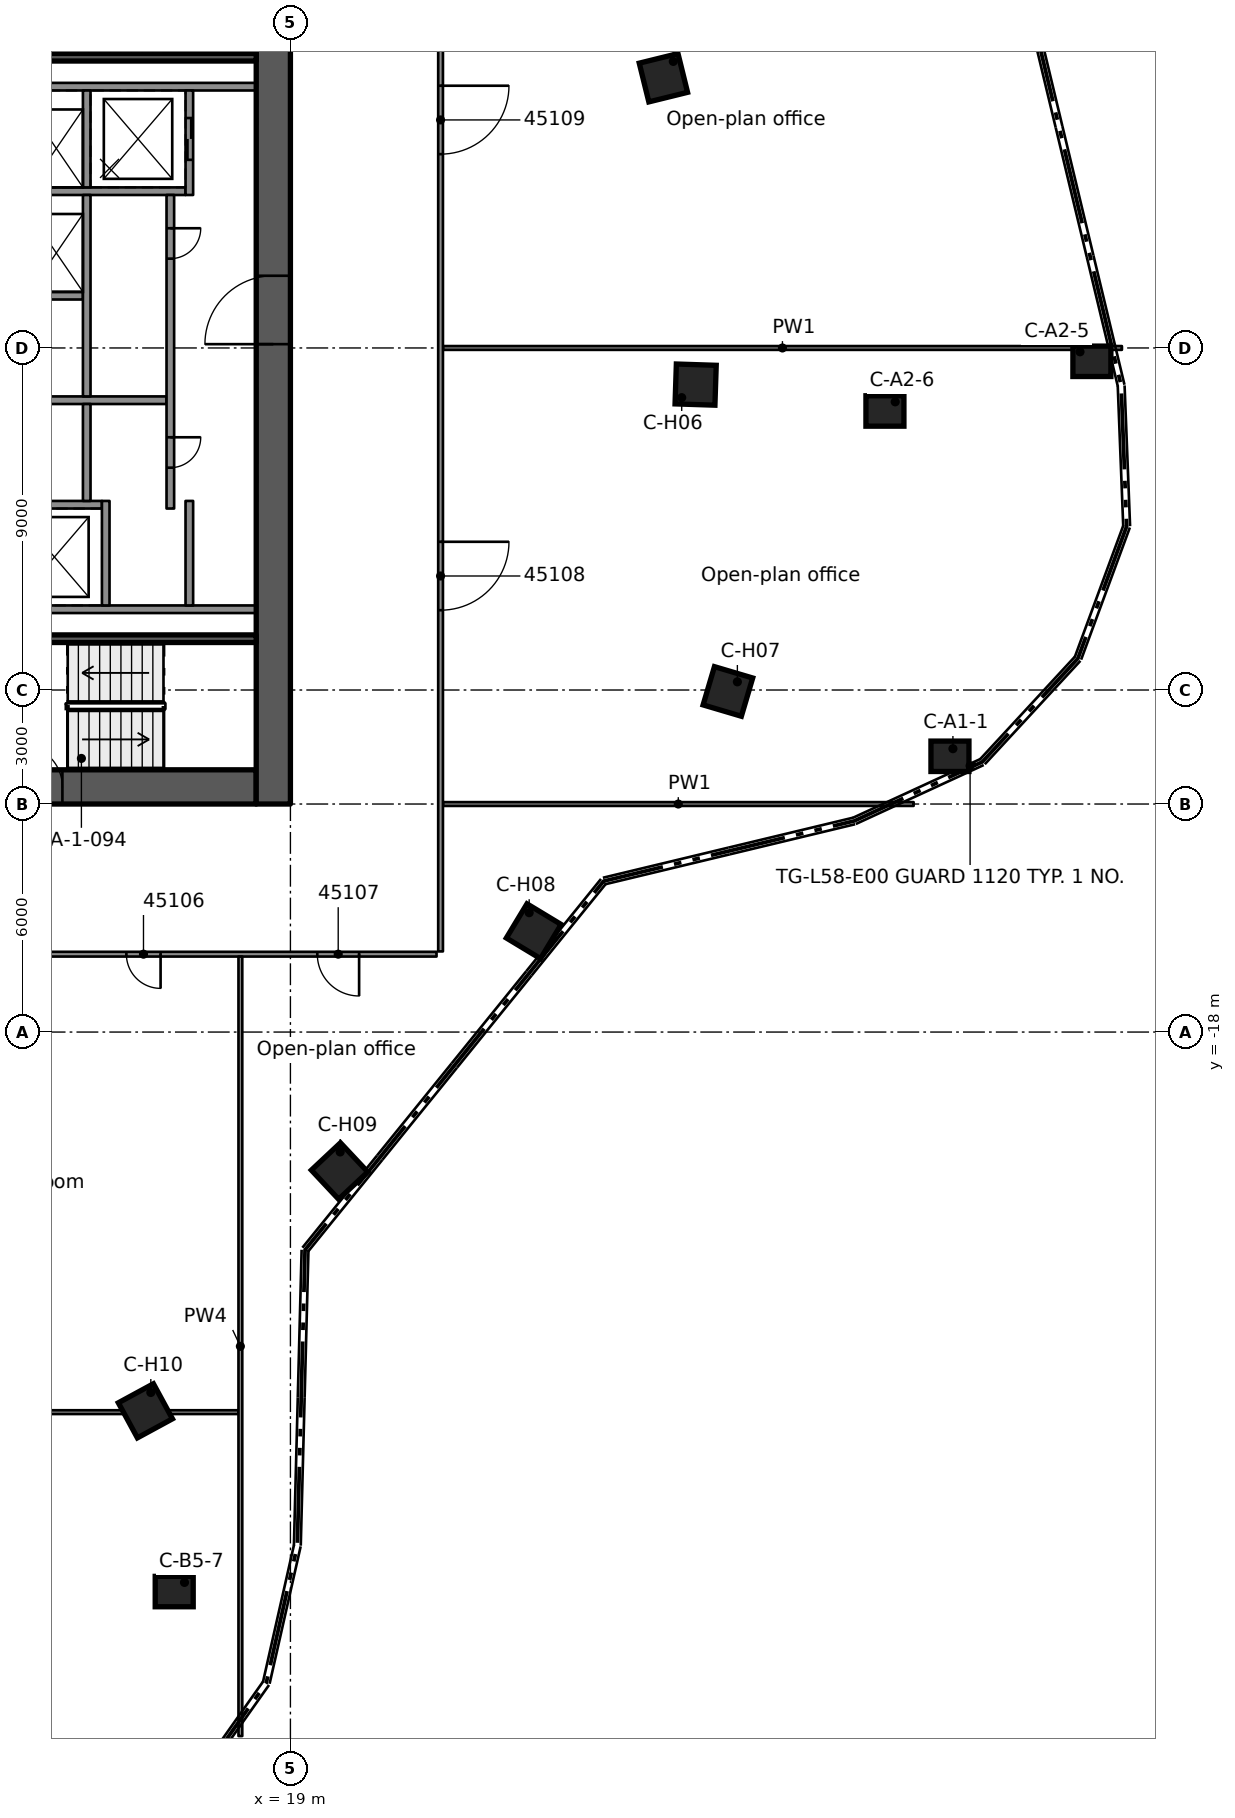
"""IFC4 building model, lengths in metres.
Left out: names, types, materials, properties, quantities, classifications, styles, units other than length and angle.
Written with IfcOpenShell. Run it as: python <this file> out.ifc"""

import sys

from ifc_helpers import new_model, si_unit, direction, frame, frame_2d, origin, origin_2d, place, context, subcontext, project, spatial, rectangle, extrude, element, fill, save


model = new_model("IFC4")
c1 = context("Model", 3, precision=1e-05, world=origin(), true_north=direction((0.0, 1.0)))
c2 = subcontext(c1, "Body", "Model", "MODEL_VIEW")
j1 = project(units=[si_unit("LENGTHUNIT", "METRE"), si_unit("PLANEANGLEUNIT", "RADIAN")], contexts=[c1])
p1 = place(None, origin())
s1 = spatial("IfcSite", under=j1, at=p1, CompositionType="ELEMENT")
p2 = place(p1, origin())
s2 = spatial("IfcBuilding", under=s1, at=p2, CompositionType="ELEMENT")
p3 = place(p2, frame((0.0, 0.0, 221.0)))
s3 = spatial("IfcBuildingStorey", under=s2, at=p3, CompositionType="ELEMENT", Elevation=221.0)
p4 = place(p3, frame((8.9, -11.55, 0.0), z_axis=(0.0, 0.0, 1.0), x_axis=(1.0, 0.0, 0.0)))
e1 = element("IfcWall", 1, at=p4, inside=s3, PredefinedType="SHEAR", context=c2, shape_type="SweptSolid", body=[
    extrude(rectangle(XDim=9.2, YDim=0.9, at=frame_2d((4.6, 0.0))), origin(), (0.0, 0.0, 1.0), 3.5),
])
p5 = place(p4, frame((3.0, 0.0, 0.0)))
e2 = element("IfcOpeningElement", 2, at=p5, cuts=e1, PredefinedType="OPENING", context=c2, shape_type="SweptSolid", body=[
    extrude(rectangle(XDim=1.1, YDim=2.1, at=frame_2d((0.55, 1.05))), frame((0.0, 0.46, 0.0), z_axis=(0.0, -1.0, 0.0), x_axis=(1.0, 0.0, 0.0)), (0.0, 0.0, 1.0), 0.92),
])
p6 = place(p3, frame((18.55, -12.0, 0.0), z_axis=(0.0, 0.0, 1.0), x_axis=(0.0, 1.0, 0.0)))
e3 = element("IfcWall", 3, at=p6, inside=s3, PredefinedType="SHEAR", context=c2, shape_type="SweptSolid", body=[
    extrude(rectangle(XDim=24.0, YDim=0.9, at=frame_2d((12.0, 0.0))), origin(), (0.0, 0.0, 1.0), 3.5),
])
p7 = place(p6, frame((12.1, 0.0, 0.0)))
e4 = element("IfcOpeningElement", 4, at=p7, cuts=e3, PredefinedType="OPENING", context=c2, shape_type="SweptSolid", body=[
    extrude(rectangle(XDim=1.8, YDim=2.1, at=frame_2d((0.9, 1.05))), frame((0.0, 0.46, 0.0), z_axis=(0.0, -1.0, 0.0), x_axis=(1.0, 0.0, 0.0)), (0.0, 0.0, 1.0), 0.92),
])
for number, where, z_axis, x_axis in (
    (5, (36.355, -10.744, 0.0), (0.0, 0.0, 1.0), (1.0, 0.0, 0.0)),
    (6, (40.09, -0.351, 0.0), (0.0, 0.0, 1.0), (1.0, 0.0, 0.0)),
    (7, (34.644, -1.658, 0.0), (0.0, 0.0, 1.0), (1.0, 0.0, 0.0)),
    (8, (15.942, -32.722, 0.0), (0.0, 0.0, 1.0), (1.0, 0.0, 0.0)),
):
    element("IfcColumn", number, at=place(p3, frame(where, z_axis=z_axis, x_axis=x_axis)), inside=s3, PredefinedType="COLUMN", context=c2, shape_type="SweptSolid", body=[
        extrude(rectangle(XDim=1.0, YDim=0.8, at=origin_2d()), origin(), (0.0, 0.0, 1.0), 3.5),
    ])
for number, where, z_axis, x_axis in (
    (9, (28.815, 7.11, 0.0), (0.0, 0.0, 1.0), (0.971, 0.24, 0.0)),
    (10, (29.663, -0.964, 0.0), (0.0, 0.0, 1.0), (0.999, -0.032, 0.0)),
    (11, (30.512, -9.038, 0.0), (0.0, 0.0, 1.0), (0.959, -0.284, 0.0)),
    (12, (25.403, -15.347, 0.0), (0.0, 0.0, 1.0), (0.856, -0.517, 0.0)),
    (13, (20.293, -21.657, 0.0), (0.0, 0.0, 1.0), (0.684, -0.73, 0.0)),
    (14, (15.184, -27.966, 0.0), (0.0, 0.0, 1.0), (0.477, -0.879, 0.0)),
):
    element("IfcColumn", number, at=place(p3, frame(where, z_axis=z_axis, x_axis=x_axis)), inside=s3, PredefinedType="COLUMN", context=c2, shape_type="SweptSolid", body=[
        extrude(rectangle(XDim=1.05, YDim=1.05, at=origin_2d()), origin(), (0.0, 0.0, 1.0), 3.5),
    ])
for number, where, z_axis, x_axis in (
    (15, (11.54, -6.875, 0.0), (0.0, 0.0, 1.0), (1.0, 0.0, 0.0)),
    (16, (11.54, 6.875, 0.0), (0.0, 0.0, 1.0), (1.0, 0.0, 0.0)),
):
    element("IfcWall", number, at=place(p3, frame(where, z_axis=z_axis, x_axis=x_axis)), inside=s3, PredefinedType="SOLIDWALL", context=c2, shape_type="SweptSolid", body=[
        extrude(rectangle(XDim=6.56, YDim=0.2, at=frame_2d((3.28, 0.0))), origin(), (0.0, 0.0, 1.0), 3.08),
    ])
p8 = place(p3, frame((11.54, 4.125, 0.0), z_axis=(0.0, 0.0, 1.0), x_axis=(1.0, 0.0, 0.0)))
e17 = element("IfcWall", 17, at=p8, inside=s3, PredefinedType="SOLIDWALL", context=c2, shape_type="SweptSolid", body=[
    extrude(rectangle(XDim=4.7, YDim=0.2, at=frame_2d((2.35, 0.0))), origin(), (0.0, 0.0, 1.0), 3.08),
])
p9 = place(p3, frame((11.54, 1.375, 0.0), z_axis=(0.0, 0.0, 1.0), x_axis=(1.0, 0.0, 0.0)))
e18 = element("IfcWall", 18, at=p9, inside=s3, PredefinedType="SOLIDWALL", context=c2, shape_type="SweptSolid", body=[
    extrude(rectangle(XDim=2.0, YDim=0.2, at=frame_2d((1.0, 0.0))), origin(), (0.0, 0.0, 1.0), 3.08),
])
p10 = place(p3, frame((11.54, -1.375, 0.0), z_axis=(0.0, 0.0, 1.0), x_axis=(1.0, 0.0, 0.0)))
e19 = element("IfcWall", 19, at=p10, inside=s3, PredefinedType="SOLIDWALL", context=c2, shape_type="SweptSolid", body=[
    extrude(rectangle(XDim=4.2, YDim=0.2, at=frame_2d((2.1, 0.0))), origin(), (0.0, 0.0, 1.0), 3.08),
])
p11 = place(p3, frame((11.54, -4.125, 0.0), z_axis=(0.0, 0.0, 1.0), x_axis=(1.0, 0.0, 0.0)))
e20 = element("IfcWall", 20, at=p11, inside=s3, PredefinedType="SOLIDWALL", context=c2, shape_type="SweptSolid", body=[
    extrude(rectangle(XDim=2.5, YDim=0.2, at=frame_2d((1.25, 0.0))), origin(), (0.0, 0.0, 1.0), 3.08),
])
p12 = place(p3, frame((13.64, 6.775, 0.0), z_axis=(0.0, 0.0, 1.0), x_axis=(0.0, -1.0, 0.0)))
e21 = element("IfcWall", 21, at=p12, inside=s3, PredefinedType="SOLIDWALL", context=c2, shape_type="SweptSolid", body=[
    extrude(rectangle(XDim=2.55, YDim=0.2, at=frame_2d((1.275, 0.0))), origin(), (0.0, 0.0, 1.0), 3.08),
])
p13 = place(p3, frame((13.64, 4.025, 0.0), z_axis=(0.0, 0.0, 1.0), x_axis=(0.0, -1.0, 0.0)))
e22 = element("IfcWall", 22, at=p13, inside=s3, PredefinedType="SOLIDWALL", context=c2, shape_type="SweptSolid", body=[
    extrude(rectangle(XDim=5.3, YDim=0.2, at=frame_2d((2.65, 0.0))), origin(), (0.0, 0.0, 1.0), 3.08),
])
p14 = place(p3, frame((13.64, -1.475, 0.0), z_axis=(0.0, 0.0, 1.0), x_axis=(0.0, -1.0, 0.0)))
e23 = element("IfcWall", 23, at=p14, inside=s3, PredefinedType="SOLIDWALL", context=c2, shape_type="SweptSolid", body=[
    extrude(rectangle(XDim=2.55, YDim=0.2, at=frame_2d((1.275, 0.0))), origin(), (0.0, 0.0, 1.0), 3.08),
])
p15 = place(p3, frame((14.14, -4.025, 0.0), z_axis=(0.0, 0.0, 1.0), x_axis=(0.0, -1.0, 0.0)))
e24 = element("IfcWall", 24, at=p15, inside=s3, PredefinedType="SOLIDWALL", context=c2, shape_type="SweptSolid", body=[
    extrude(rectangle(XDim=2.75, YDim=0.2, at=frame_2d((1.375, 0.0))), origin(), (0.0, 0.0, 1.0), 3.08),
])
p16 = place(p3, frame((16.34, 6.775, 0.0), z_axis=(0.0, 0.0, 1.0), x_axis=(0.0, -1.0, 0.0)))
e25 = element("IfcWall", 25, at=p16, inside=s3, PredefinedType="SOLIDWALL", context=c2, shape_type="SweptSolid", body=[
    extrude(rectangle(XDim=2.75, YDim=0.2, at=frame_2d((1.375, 0.0))), origin(), (0.0, 0.0, 1.0), 3.08),
])
p17 = place(p16, frame((0.725, 0.0, 0.0)))
e26 = element("IfcOpeningElement", 26, at=p17, cuts=e25, PredefinedType="OPENING", context=c2, shape_type="SweptSolid", body=[
    extrude(rectangle(XDim=1.1, YDim=2.1, at=frame_2d((0.55, 1.05))), frame((0.0, 0.11, 0.0), z_axis=(0.0, -1.0, 0.0), x_axis=(1.0, 0.0, 0.0)), (0.0, 0.0, 1.0), 0.22),
])
p18 = place(p3, frame((15.84, 4.025, 0.0), z_axis=(0.0, 0.0, 1.0), x_axis=(0.0, -1.0, 0.0)))
e27 = element("IfcWall", 27, at=p18, inside=s3, PredefinedType="SOLIDWALL", context=c2, shape_type="SweptSolid", body=[
    extrude(rectangle(XDim=8.25, YDim=0.2, at=frame_2d((4.125, 0.0))), origin(), (0.0, 0.0, 1.0), 3.08),
])
p19 = place(p18, frame((0.875, 0.0, 0.0)))
e28 = element("IfcOpeningElement", 28, at=p19, cuts=e27, PredefinedType="OPENING", context=c2, shape_type="SweptSolid", body=[
    extrude(rectangle(XDim=0.8, YDim=2.1, at=frame_2d((0.4, 1.05))), frame((0.0, 0.11, 0.0), z_axis=(0.0, -1.0, 0.0), x_axis=(1.0, 0.0, 0.0)), (0.0, 0.0, 1.0), 0.22),
])
p20 = place(p18, frame((6.375, 0.0, 0.0)))
e29 = element("IfcOpeningElement", 29, at=p20, cuts=e27, PredefinedType="OPENING", context=c2, shape_type="SweptSolid", body=[
    extrude(rectangle(XDim=0.8, YDim=2.1, at=frame_2d((0.4, 1.05))), frame((0.0, 0.11, 0.0), z_axis=(0.0, -1.0, 0.0), x_axis=(1.0, 0.0, 0.0)), (0.0, 0.0, 1.0), 0.22),
])
p21 = place(p3, frame((16.34, -4.025, 0.0), z_axis=(0.0, 0.0, 1.0), x_axis=(0.0, -1.0, 0.0)))
e30 = element("IfcWall", 30, at=p21, inside=s3, PredefinedType="SOLIDWALL", context=c2, shape_type="SweptSolid", body=[
    extrude(rectangle(XDim=2.75, YDim=0.2, at=frame_2d((1.375, 0.0))), origin(), (0.0, 0.0, 1.0), 3.08),
])
for number, where, z_axis, x_axis in (
    (31, (11.54, -7.65, 0.0), (0.0, 0.0, 1.0), (1.0, 0.0, 0.0)),
    (32, (11.54, 7.65, 0.0), (0.0, 0.0, 1.0), (1.0, 0.0, 0.0)),
):
    element("IfcWall", number, at=place(p3, frame(where, z_axis=z_axis, x_axis=x_axis)), inside=s3, PredefinedType="SOLIDWALL", context=c2, shape_type="SweptSolid", body=[
        extrude(rectangle(XDim=6.56, YDim=0.2, at=frame_2d((3.28, 0.0))), origin(), (0.0, 0.0, 1.0), 3.08),
    ])
p22 = place(p3, frame((5.999, -28.001, 0.0), z_axis=(0.0, 0.0, 1.0), x_axis=(1.0, 0.0, 0.0)))
e33 = element("IfcWall", 33, at=p22, inside=s3, PredefinedType="PARTITIONING", context=c2, shape_type="SweptSolid", body=[
    extrude(rectangle(XDim=11.634, YDim=0.1, at=frame_2d((5.817, 0.0))), origin(), (0.0, 0.0, 1.0), 2.449),
])
p23 = place(p3, frame((22.845, -15.951, 0.0), z_axis=(0.0, 0.0, 1.0), x_axis=(-1.0, 0.0, 0.0)))
e34 = element("IfcWall", 34, at=p23, inside=s3, PredefinedType="PARTITIONING", context=c2, shape_type="SweptSolid", body=[
    extrude(rectangle(XDim=10.385, YDim=0.125, at=frame_2d((5.192, 0.0))), origin(), (0.0, 0.0, 1.0), 3.06),
])
p24 = place(p23, frame((7.261, 0.0, 0.0)))
e35 = element("IfcOpeningElement", 35, at=p24, cuts=e34, PredefinedType="OPENING", context=c2, shape_type="SweptSolid", body=[
    extrude(rectangle(XDim=0.9, YDim=2.1, at=frame_2d((0.45, 1.05))), frame((0.0, 0.073, 0.0), z_axis=(0.0, -1.0, 0.0), x_axis=(1.0, 0.0, 0.0)), (0.0, 0.0, 1.0), 0.145),
])
p25 = place(p23, frame((2.038, 0.0, 0.0)))
e36 = element("IfcOpeningElement", 36, at=p25, cuts=e34, PredefinedType="OPENING", context=c2, shape_type="SweptSolid", body=[
    extrude(rectangle(XDim=1.1, YDim=2.1, at=frame_2d((0.55, 1.05))), frame((0.0, 0.073, 0.0), z_axis=(0.0, -1.0, 0.0), x_axis=(1.0, 0.0, 0.0)), (0.0, 0.0, 1.0), 0.145),
])
p26 = place(p3, frame((23.014, -12.0, 0.0), z_axis=(0.0, 0.0, 1.0), x_axis=(1.0, 0.0, 0.0)))
e37 = element("IfcWall", 37, at=p26, inside=s3, PredefinedType="PARTITIONING", context=c2, shape_type="SweptSolid", body=[
    extrude(rectangle(XDim=12.385, YDim=0.1, at=frame_2d((6.192, 0.0))), origin(), (0.0, 0.0, 1.0), 3.06),
])
p27 = place(p3, frame((23.014, 0.0, 0.0), z_axis=(0.0, 0.0, 1.0), x_axis=(1.0, 0.0, 0.0)))
e38 = element("IfcWall", 38, at=p27, inside=s3, PredefinedType="PARTITIONING", context=c2, shape_type="SweptSolid", body=[
    extrude(rectangle(XDim=17.866, YDim=0.1, at=frame_2d((8.933, 0.0))), origin(), (0.0, 0.0, 1.0), 3.06),
])
p28 = place(p3, frame((22.951, 15.95, 0.0), z_axis=(0.0, 0.0, 1.0), x_axis=(0.0, -1.0, 0.0)))
e39 = element("IfcWall", 39, at=p28, inside=s3, PredefinedType="PARTITIONING", context=c2, shape_type="SweptSolid", body=[
    extrude(rectangle(XDim=31.828, YDim=0.125, at=frame_2d((15.914, 0.0))), origin(), (0.0, 0.0, 1.0), 3.06),
])
p29 = place(p28, frame((21.05, 0.0, 0.0)))
e40 = element("IfcOpeningElement", 40, at=p29, cuts=e39, PredefinedType="OPENING", context=c2, shape_type="SweptSolid", body=[
    extrude(rectangle(XDim=1.8, YDim=2.1, at=frame_2d((0.9, 1.05))), frame((0.0, 0.073, 0.0), z_axis=(0.0, -1.0, 0.0), x_axis=(1.0, 0.0, 0.0)), (0.0, 0.0, 1.0), 0.145),
])
p30 = place(p28, frame((9.05, 0.0, 0.0)))
e41 = element("IfcOpeningElement", 41, at=p30, cuts=e39, PredefinedType="OPENING", context=c2, shape_type="SweptSolid", body=[
    extrude(rectangle(XDim=1.8, YDim=2.1, at=frame_2d((0.9, 1.05))), frame((0.0, 0.073, 0.0), z_axis=(0.0, -1.0, 0.0), x_axis=(1.0, 0.0, 0.0)), (0.0, 0.0, 1.0), 0.145),
])
p31 = place(p28, frame((1.1, 0.0, 0.0)))
e42 = element("IfcOpeningElement", 42, at=p31, cuts=e39, PredefinedType="OPENING", context=c2, shape_type="SweptSolid", body=[
    extrude(rectangle(XDim=1.8, YDim=2.1, at=frame_2d((0.9, 1.05))), frame((0.0, 0.073, 0.0), z_axis=(0.0, -1.0, 0.0), x_axis=(1.0, 0.0, 0.0)), (0.0, 0.0, 1.0), 0.145),
])
p32 = place(p3, frame((17.683, -36.524, 0.0), z_axis=(0.0, 0.0, 1.0), x_axis=(0.0, 1.0, 0.0)))
e43 = element("IfcWall", 43, at=p32, inside=s3, PredefinedType="PARTITIONING", context=c2, shape_type="SweptSolid", body=[
    extrude(rectangle(XDim=20.51, YDim=0.1, at=frame_2d((10.255, 0.0))), origin(), (0.0, 0.0, 1.0), 2.449),
])
p33 = place(p17, origin())
e44 = element("IfcDoor", 44, at=p33, inside=s3, OperationType="DOUBLE_DOOR_SLIDING", PredefinedType="DOOR", context=c2, shape_type="SweptSolid", body=[
    extrude(rectangle(XDim=1.1, YDim=2.1, at=frame_2d((0.55, 1.05))), frame((0.0, 0.025, 0.0), z_axis=(0.0, -1.0, 0.0), x_axis=(1.0, 0.0, 0.0)), (0.0, 0.0, 1.0), 0.05),
])
fill(e26, e44)
p34 = place(p19, origin())
e45 = element("IfcDoor", 45, at=p34, inside=s3, OperationType="SINGLE_SWING_LEFT", PredefinedType="DOOR", context=c2, shape_type="SweptSolid", body=[
    extrude(rectangle(XDim=0.8, YDim=2.1, at=frame_2d((0.4, 1.05))), frame((0.0, 0.025, 0.0), z_axis=(0.0, -1.0, 0.0), x_axis=(1.0, 0.0, 0.0)), (0.0, 0.0, 1.0), 0.05),
])
fill(e28, e45)
p35 = place(p20, origin())
e46 = element("IfcDoor", 46, at=p35, inside=s3, OperationType="SINGLE_SWING_LEFT", PredefinedType="DOOR", context=c2, shape_type="SweptSolid", body=[
    extrude(rectangle(XDim=0.8, YDim=2.1, at=frame_2d((0.4, 1.05))), frame((0.0, 0.025, 0.0), z_axis=(0.0, -1.0, 0.0), x_axis=(1.0, 0.0, 0.0)), (0.0, 0.0, 1.0), 0.05),
])
fill(e29, e46)
p36 = place(p7, origin())
e47 = element("IfcDoor", 47, at=p36, inside=s3, OperationType="SINGLE_SWING_RIGHT", PredefinedType="DOOR", context=c2, shape_type="SweptSolid", body=[
    extrude(rectangle(XDim=1.8, YDim=2.1, at=frame_2d((0.9, 1.05))), frame((0.0, 0.025, 0.0), z_axis=(0.0, -1.0, 0.0), x_axis=(1.0, 0.0, 0.0)), (0.0, 0.0, 1.0), 0.05),
])
fill(e4, e47)
p37 = place(p5, origin())
e48 = element("IfcDoor", 48, at=p37, inside=s3, OperationType="SINGLE_SWING_LEFT", PredefinedType="DOOR", context=c2, shape_type="SweptSolid", body=[
    extrude(rectangle(XDim=1.1, YDim=2.1, at=frame_2d((0.55, 1.05))), frame((0.0, 0.025, 0.0), z_axis=(0.0, -1.0, 0.0), x_axis=(1.0, 0.0, 0.0)), (0.0, 0.0, 1.0), 0.05),
])
fill(e2, e48)
p38 = place(p24, origin())
e49 = element("IfcDoor", 49, at=p38, inside=s3, OperationType="SINGLE_SWING_RIGHT", PredefinedType="DOOR", context=c2, shape_type="SweptSolid", body=[
    extrude(rectangle(XDim=0.9, YDim=2.1, at=frame_2d((0.45, 1.05))), frame((0.0, 0.025, 0.0), z_axis=(0.0, -1.0, 0.0), x_axis=(1.0, 0.0, 0.0)), (0.0, 0.0, 1.0), 0.05),
])
fill(e35, e49)
p39 = place(p25, origin())
e50 = element("IfcDoor", 50, at=p39, inside=s3, OperationType="SINGLE_SWING_LEFT", PredefinedType="DOOR", context=c2, shape_type="SweptSolid", body=[
    extrude(rectangle(XDim=1.1, YDim=2.1, at=frame_2d((0.55, 1.05))), frame((0.0, 0.025, 0.0), z_axis=(0.0, -1.0, 0.0), x_axis=(1.0, 0.0, 0.0)), (0.0, 0.0, 1.0), 0.05),
])
fill(e36, e50)
p40 = place(p29, origin())
e51 = element("IfcDoor", 51, at=p40, inside=s3, OperationType="DOUBLE_DOOR_SINGLE_SWING", PredefinedType="DOOR", context=c2, shape_type="SweptSolid", body=[
    extrude(rectangle(XDim=1.8, YDim=2.1, at=frame_2d((0.9, 1.05))), frame((0.0, 0.025, 0.0), z_axis=(0.0, -1.0, 0.0), x_axis=(1.0, 0.0, 0.0)), (0.0, 0.0, 1.0), 0.05),
])
fill(e40, e51)
p41 = place(p30, origin())
e52 = element("IfcDoor", 52, at=p41, inside=s3, OperationType="DOUBLE_DOOR_SINGLE_SWING", PredefinedType="DOOR", context=c2, shape_type="SweptSolid", body=[
    extrude(rectangle(XDim=1.8, YDim=2.1, at=frame_2d((0.9, 1.05))), frame((0.0, 0.025, 0.0), z_axis=(0.0, -1.0, 0.0), x_axis=(1.0, 0.0, 0.0)), (0.0, 0.0, 1.0), 0.05),
])
fill(e41, e52)
save(model, sys.argv[1])
